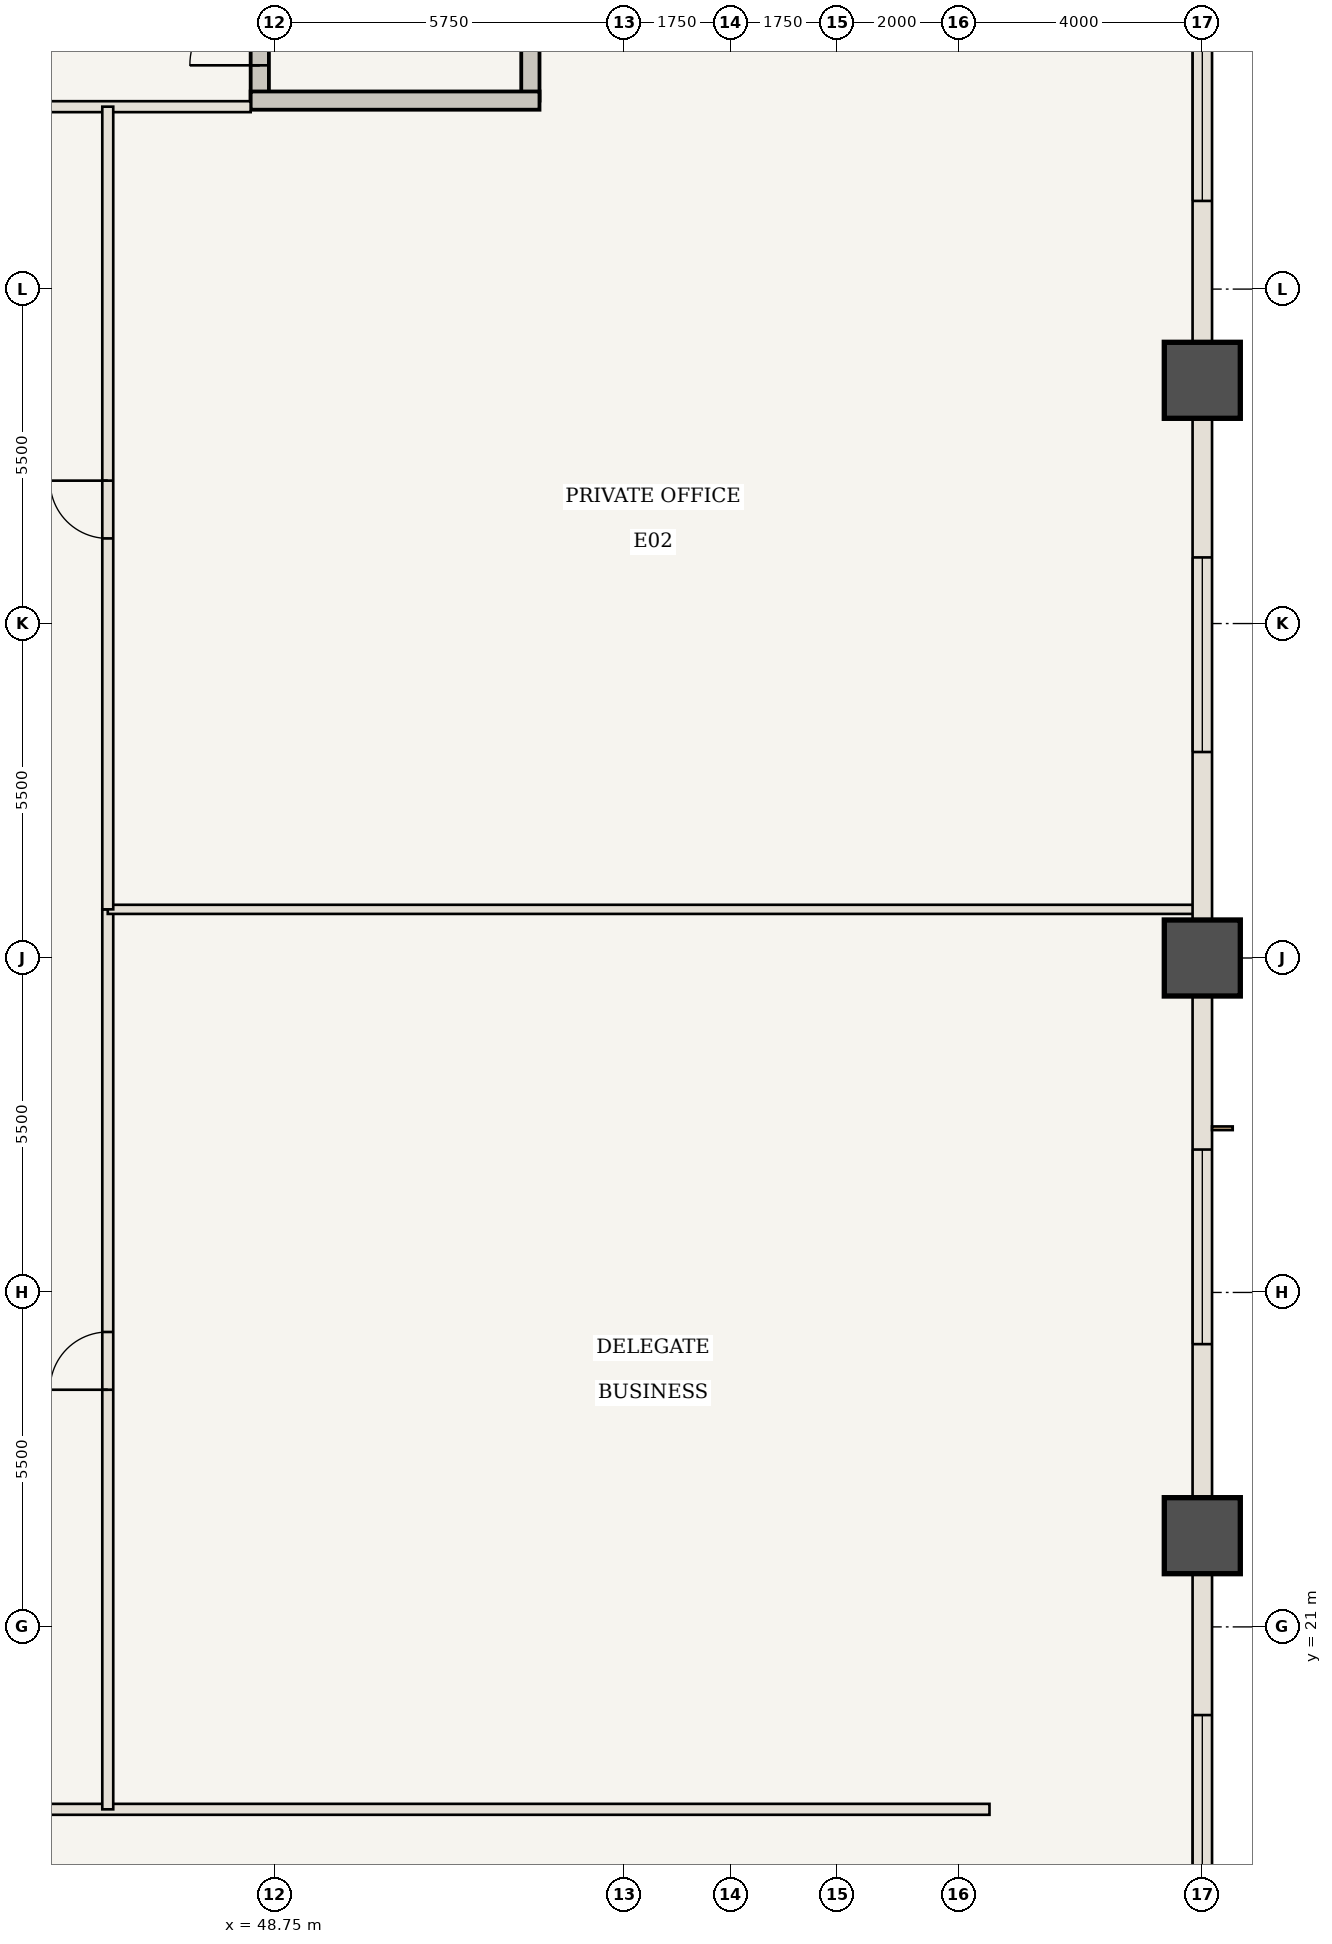
"""IFC4 building model, lengths in metres.
Left out: names, types, materials, properties, quantities, classifications, styles, units other than length and angle.
Written with IfcOpenShell. Run it as: python <this file> out.ifc"""

import sys

from ifc_helpers import new_model, si_unit, direction, frame, frame_2d, origin, origin_2d, place, context, subcontext, project, spatial, rectangle, extrude, element, fill, save


model = new_model("IFC4")
c1 = context("Model", 3, precision=1e-05, world=origin(), true_north=direction((0.0, 1.0)))
c2 = subcontext(c1, "Body", "Model", "MODEL_VIEW")
j1 = project(units=[si_unit("LENGTHUNIT", "METRE"), si_unit("PLANEANGLEUNIT", "RADIAN")], contexts=[c1])
p1 = place(None, origin())
s1 = spatial("IfcSite", under=j1, at=p1, CompositionType="ELEMENT")
p2 = place(p1, origin())
s2 = spatial("IfcBuilding", under=s1, at=p2, CompositionType="ELEMENT")
p3 = place(p2, frame((0.0, 0.0, 23.8)))
s3 = spatial("IfcBuildingStorey", under=s2, at=p3, CompositionType="ELEMENT", Elevation=23.8)
for number, where, z_axis, x_axis in (
    (1, (64.0, 22.5, 0.0), (0.0, 0.0, 1.0), (1.0, 0.0, 0.0)),
    (2, (64.0, 32.0, 0.0), (0.0, 0.0, 1.0), (1.0, 0.0, 0.0)),
    (3, (64.0, 41.5, 0.0), (0.0, 0.0, 1.0), (1.0, 0.0, 0.0)),
):
    element("IfcColumn", number, at=place(p3, frame(where, z_axis=z_axis, x_axis=x_axis)), inside=s3, PredefinedType="COLUMN", context=c2, shape_type="SweptSolid", body=[
        extrude(rectangle(XDim=1.25, YDim=1.25, at=origin_2d()), origin(), (0.0, 0.0, 1.0), 5.6),
    ])
p4 = place(p3, frame((48.5, 46.1, 0.0), z_axis=(0.0, 0.0, 1.0), x_axis=(0.0, 1.0, 0.0)))
e4 = element("IfcWall", 4, at=p4, inside=s3, PredefinedType="SHEAR", context=c2, shape_type="SweptSolid", body=[
    extrude(rectangle(XDim=10.5, YDim=0.3, at=frame_2d((5.25, 0.0))), origin(), (0.0, 0.0, 1.0), 5.18),
])
p5 = place(p4, frame((0.58, 0.0, 0.0)))
e5 = element("IfcOpeningElement", 5, at=p5, cuts=e4, PredefinedType="OPENING", context=c2, shape_type="SweptSolid", body=[
    extrude(rectangle(XDim=1.15, YDim=2.15, at=frame_2d((0.575, 1.075))), frame((0.0, 0.16, 0.0), z_axis=(0.0, -1.0, 0.0), x_axis=(1.0, 0.0, 0.0)), (0.0, 0.0, 1.0), 0.32),
])
p6 = place(p3, frame((52.95, 46.1, 0.0), z_axis=(0.0, 0.0, 1.0), x_axis=(0.0, 1.0, 0.0)))
e6 = element("IfcWall", 6, at=p6, inside=s3, PredefinedType="SHEAR", context=c2, shape_type="SweptSolid", body=[
    extrude(rectangle(XDim=10.5, YDim=0.3, at=frame_2d((5.25, 0.0))), origin(), (0.0, 0.0, 1.0), 5.18),
])
p7 = place(p3, frame((48.35, 46.1, 0.0), z_axis=(0.0, 0.0, 1.0), x_axis=(1.0, 0.0, 0.0)))
e7 = element("IfcWall", 7, at=p7, inside=s3, PredefinedType="SHEAR", context=c2, shape_type="SweptSolid", body=[
    extrude(rectangle(XDim=4.75, YDim=0.3, at=frame_2d((2.375, 0.0))), origin(), (0.0, 0.0, 1.0), 5.18),
])
p8 = place(p3, frame((41.0, 18.0, 0.0), z_axis=(0.0, 0.0, 1.0), x_axis=(1.0, 0.0, 0.0)))
e8 = element("IfcWall", 8, at=p8, inside=s3, PredefinedType="STANDARD", context=c2, shape_type="SweptSolid", body=[
    extrude(rectangle(XDim=19.5, YDim=0.18, at=frame_2d((9.75, 0.0))), origin(), (0.0, 0.0, 1.0), 5.18),
])
p9 = place(p8, frame((1.975, 0.0, 0.0)))
e9 = element("IfcOpeningElement", 9, at=p9, cuts=e8, PredefinedType="OPENING", context=c2, shape_type="SweptSolid", body=[
    extrude(rectangle(XDim=1.8, YDim=2.35, at=frame_2d((0.9, 1.175))), frame((0.0, 0.1, 0.0), z_axis=(0.0, -1.0, 0.0), x_axis=(1.0, 0.0, 0.0)), (0.0, 0.0, 1.0), 0.2),
])
p10 = place(p3, frame((36.5, 46.0, 0.0), z_axis=(0.0, 0.0, 1.0), x_axis=(1.0, 0.0, 0.0)))
e10 = element("IfcWall", 10, at=p10, inside=s3, PredefinedType="STANDARD", context=c2, shape_type="SweptSolid", body=[
    extrude(rectangle(XDim=11.85, YDim=0.18, at=frame_2d((5.925, 0.0))), origin(), (0.0, 0.0, 1.0), 5.18),
])
p11 = place(p10, frame((0.85, 0.0, 0.0)))
e11 = element("IfcOpeningElement", 11, at=p11, cuts=e10, PredefinedType="OPENING", context=c2, shape_type="SweptSolid", body=[
    extrude(rectangle(XDim=1.25, YDim=2.2, at=frame_2d((0.625, 1.1))), frame((0.0, 0.1, 0.0), z_axis=(0.0, -1.0, 0.0), x_axis=(1.0, 0.0, 0.0)), (0.0, 0.0, 1.0), 0.2),
])
p12 = place(p3, frame((46.0, 18.0, 0.0), z_axis=(0.0, 0.0, 1.0), x_axis=(0.0, 1.0, 0.0)))
e12 = element("IfcWall", 12, at=p12, inside=s3, PredefinedType="STANDARD", context=c2, shape_type="SweptSolid", body=[
    extrude(rectangle(XDim=14.8, YDim=0.18, at=frame_2d((7.4, 0.0))), origin(), (0.0, 0.0, 1.0), 5.18),
])
p13 = place(p12, frame((6.9, 0.0, 0.0)))
e13 = element("IfcOpeningElement", 13, at=p13, cuts=e12, PredefinedType="OPENING", context=c2, shape_type="SweptSolid", body=[
    extrude(rectangle(XDim=0.95, YDim=2.15, at=frame_2d((0.475, 1.075))), frame((0.0, 0.1, 0.0), z_axis=(0.0, -1.0, 0.0), x_axis=(1.0, 0.0, 0.0)), (0.0, 0.0, 1.0), 0.2),
])
p14 = place(p3, frame((46.0, 32.8, 0.0), z_axis=(0.0, 0.0, 1.0), x_axis=(1.0, 0.0, 0.0)))
e14 = element("IfcWall", 14, at=p14, inside=s3, PredefinedType="STANDARD", context=c2, shape_type="SweptSolid", body=[
    extrude(rectangle(XDim=17.94, YDim=0.15, at=frame_2d((8.97, 0.0))), origin(), (0.0, 0.0, 1.0), 5.18),
])
p15 = place(p3, frame((46.0, 32.8, 0.0), z_axis=(0.0, 0.0, 1.0), x_axis=(0.0, 1.0, 0.0)))
e15 = element("IfcWall", 15, at=p15, inside=s3, PredefinedType="STANDARD", context=c2, shape_type="SweptSolid", body=[
    extrude(rectangle(XDim=13.2, YDim=0.18, at=frame_2d((6.6, 0.0))), origin(), (0.0, 0.0, 1.0), 5.18),
])
p16 = place(p15, frame((6.1, 0.0, 0.0)))
e16 = element("IfcOpeningElement", 16, at=p16, cuts=e15, PredefinedType="OPENING", context=c2, shape_type="SweptSolid", body=[
    extrude(rectangle(XDim=0.95, YDim=2.15, at=frame_2d((0.475, 1.075))), frame((0.0, 0.1, 0.0), z_axis=(0.0, -1.0, 0.0), x_axis=(1.0, 0.0, 0.0)), (0.0, 0.0, 1.0), 0.2),
])
p17 = place(p3, frame((64.0, 22.5, 0.0), z_axis=(0.0, 0.0, 1.0), x_axis=(0.0, -1.0, 0.0)))
e17 = element("IfcWall", 17, at=p17, inside=s3, PredefinedType="USERDEFINED", context=c2, shape_type="SweptSolid", body=[
    extrude(rectangle(XDim=9.5, YDim=0.32, at=frame_2d((4.75, 0.0))), origin(), (0.0, 0.0, 1.0), 4.28),
])
p18 = place(p17, frame((2.95, 0.0, 0.85)))
e18 = element("IfcOpeningElement", 18, at=p18, cuts=e17, PredefinedType="OPENING", context=c2, shape_type="SweptSolid", body=[
    extrude(rectangle(XDim=3.6, YDim=2.6, at=frame_2d((1.8, 1.3))), frame((0.0, 0.17, 0.0), z_axis=(0.0, -1.0, 0.0), x_axis=(1.0, 0.0, 0.0)), (0.0, 0.0, 1.0), 0.34),
])
p19 = place(p3, frame((64.0, 32.0, 0.0), z_axis=(0.0, 0.0, 1.0), x_axis=(0.0, -1.0, 0.0)))
e19 = element("IfcWall", 19, at=p19, inside=s3, PredefinedType="USERDEFINED", context=c2, shape_type="SweptSolid", body=[
    extrude(rectangle(XDim=9.5, YDim=0.32, at=frame_2d((4.75, 0.0))), origin(), (0.0, 0.0, 1.0), 4.28),
])
p20 = place(p19, frame((3.15, 0.0, 0.85)))
e20 = element("IfcOpeningElement", 20, at=p20, cuts=e19, PredefinedType="OPENING", context=c2, shape_type="SweptSolid", body=[
    extrude(rectangle(XDim=3.2, YDim=2.4, at=frame_2d((1.6, 1.2))), frame((0.0, 0.17, 0.0), z_axis=(0.0, -1.0, 0.0), x_axis=(1.0, 0.0, 0.0)), (0.0, 0.0, 1.0), 0.34),
])
p21 = place(p3, frame((64.0, 41.5, 0.0), z_axis=(0.0, 0.0, 1.0), x_axis=(0.0, -1.0, 0.0)))
e21 = element("IfcWall", 21, at=p21, inside=s3, PredefinedType="USERDEFINED", context=c2, shape_type="SweptSolid", body=[
    extrude(rectangle(XDim=9.5, YDim=0.32, at=frame_2d((4.75, 0.0))), origin(), (0.0, 0.0, 1.0), 4.28),
])
p22 = place(p21, frame((2.913, 0.0, 0.85)))
e22 = element("IfcOpeningElement", 22, at=p22, cuts=e21, PredefinedType="OPENING", context=c2, shape_type="SweptSolid", body=[
    extrude(rectangle(XDim=3.2, YDim=2.4, at=frame_2d((1.6, 1.2))), frame((0.0, 0.17, 0.0), z_axis=(0.0, -1.0, 0.0), x_axis=(1.0, 0.0, 0.0)), (0.0, 0.0, 1.0), 0.34),
])
p23 = place(p3, frame((64.0, 51.0, 0.0), z_axis=(0.0, 0.0, 1.0), x_axis=(0.0, -1.0, 0.0)))
e23 = element("IfcWall", 23, at=p23, inside=s3, PredefinedType="USERDEFINED", context=c2, shape_type="SweptSolid", body=[
    extrude(rectangle(XDim=9.5, YDim=0.32, at=frame_2d((4.75, 0.0))), origin(), (0.0, 0.0, 1.0), 4.28),
])
p24 = place(p23, frame((2.95, 0.0, 0.85)))
e24 = element("IfcOpeningElement", 24, at=p24, cuts=e23, PredefinedType="OPENING", context=c2, shape_type="SweptSolid", body=[
    extrude(rectangle(XDim=3.6, YDim=2.6, at=frame_2d((1.8, 1.3))), frame((0.0, 0.17, 0.0), z_axis=(0.0, -1.0, 0.0), x_axis=(1.0, 0.0, 0.0)), (0.0, 0.0, 1.0), 0.34),
])
p25 = place(p5, origin())
e25 = element("IfcDoor", 25, at=p25, inside=s3, OperationType="SINGLE_SWING_LEFT", PredefinedType="DOOR", context=c2, shape_type="SweptSolid", body=[
    extrude(rectangle(XDim=1.15, YDim=2.15, at=frame_2d((0.575, 1.075))), frame((0.0, 0.025, 0.0), z_axis=(0.0, -1.0, 0.0), x_axis=(1.0, 0.0, 0.0)), (0.0, 0.0, 1.0), 0.05),
])
fill(e5, e25)
p26 = place(p13, origin())
e26 = element("IfcDoor", 26, at=p26, inside=s3, OperationType="SINGLE_SWING_LEFT", PredefinedType="DOOR", context=c2, shape_type="SweptSolid", body=[
    extrude(rectangle(XDim=0.95, YDim=2.15, at=frame_2d((0.475, 1.075))), frame((0.0, 0.025, 0.0), z_axis=(0.0, -1.0, 0.0), x_axis=(1.0, 0.0, 0.0)), (0.0, 0.0, 1.0), 0.05),
])
fill(e13, e26)
p27 = place(p16, origin())
e27 = element("IfcDoor", 27, at=p27, inside=s3, OperationType="SINGLE_SWING_RIGHT", PredefinedType="DOOR", context=c2, shape_type="SweptSolid", body=[
    extrude(rectangle(XDim=0.95, YDim=2.15, at=frame_2d((0.475, 1.075))), frame((0.0, 0.025, 0.0), z_axis=(0.0, -1.0, 0.0), x_axis=(1.0, 0.0, 0.0)), (0.0, 0.0, 1.0), 0.05),
])
fill(e16, e27)
p28 = place(p18, origin())
e28 = element("IfcWindow", 28, at=p28, inside=s3, PartitioningType="SINGLE_PANEL", PredefinedType="WINDOW", context=c2, shape_type="SweptSolid", body=[
    extrude(rectangle(XDim=3.6, YDim=2.6, at=frame_2d((1.8, 1.3))), frame((0.0, 0.03, 0.0), z_axis=(0.0, -1.0, 0.0), x_axis=(1.0, 0.0, 0.0)), (0.0, 0.0, 1.0), 0.06),
])
fill(e18, e28)
p29 = place(p20, origin())
e29 = element("IfcWindow", 29, at=p29, inside=s3, PartitioningType="SINGLE_PANEL", PredefinedType="WINDOW", context=c2, shape_type="SweptSolid", body=[
    extrude(rectangle(XDim=3.2, YDim=2.4, at=frame_2d((1.6, 1.2))), frame((0.0, 0.03, 0.0), z_axis=(0.0, -1.0, 0.0), x_axis=(1.0, 0.0, 0.0)), (0.0, 0.0, 1.0), 0.06),
])
fill(e20, e29)
p30 = place(p22, origin())
e30 = element("IfcWindow", 30, at=p30, inside=s3, PartitioningType="SINGLE_PANEL", PredefinedType="WINDOW", context=c2, shape_type="SweptSolid", body=[
    extrude(rectangle(XDim=3.2, YDim=2.4, at=frame_2d((1.6, 1.2))), frame((0.0, 0.03, 0.0), z_axis=(0.0, -1.0, 0.0), x_axis=(1.0, 0.0, 0.0)), (0.0, 0.0, 1.0), 0.06),
])
fill(e22, e30)
p31 = place(p24, origin())
e31 = element("IfcWindow", 31, at=p31, inside=s3, PartitioningType="SINGLE_PANEL", PredefinedType="WINDOW", context=c2, shape_type="SweptSolid", body=[
    extrude(rectangle(XDim=3.6, YDim=2.6, at=frame_2d((1.8, 1.3))), frame((0.0, 0.03, 0.0), z_axis=(0.0, -1.0, 0.0), x_axis=(1.0, 0.0, 0.0)), (0.0, 0.0, 1.0), 0.06),
])
fill(e24, e31)
save(model, sys.argv[1])
